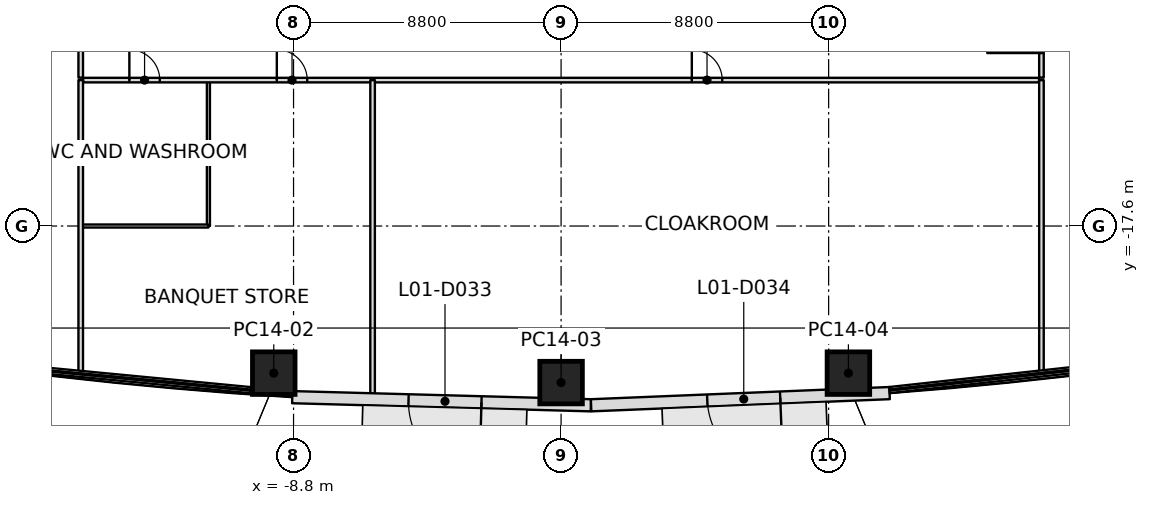
"""IFC4 building model, lengths in metres.
Left out: names, types, materials, properties, quantities, classifications, styles, units other than length and angle.
Written with IfcOpenShell. Run it as: python <this file> out.ifc"""

import sys

from ifc_helpers import new_model, si_unit, direction, frame, frame_2d, origin, origin_2d, place, context, subcontext, project, spatial, rectangle, extrude, element, fill, save


model = new_model("IFC4")
c1 = context("Model", 3, precision=1e-05, world=origin(), true_north=direction((0.0, 1.0)))
c2 = subcontext(c1, "Body", "Model", "MODEL_VIEW")
j1 = project(units=[si_unit("LENGTHUNIT", "METRE"), si_unit("PLANEANGLEUNIT", "RADIAN")], contexts=[c1])
p1 = place(None, origin())
s1 = spatial("IfcSite", under=j1, at=p1, CompositionType="ELEMENT")
p2 = place(p1, origin())
s2 = spatial("IfcBuilding", under=s1, at=p2, CompositionType="ELEMENT")
p3 = place(p2, frame((0.0, 0.0, 9.0)))
s3 = spatial("IfcBuildingStorey", under=s2, at=p3, CompositionType="ELEMENT", Elevation=9.0)
for number, where, z_axis, x_axis in (
    (1, (-9.45, -22.439, 0.0), (0.0, 0.0, 1.0), (-0.998, 0.066, 0.0)),
    (2, (0.0, -22.75, 0.0), (0.0, 0.0, 1.0), (1.0, 0.0, 0.0)),
    (3, (9.45, -22.439, 0.0), (0.0, 0.0, 1.0), (0.998, 0.066, 0.0)),
):
    element("IfcColumn", number, at=place(p3, frame(where, z_axis=z_axis, x_axis=x_axis)), inside=s3, PredefinedType="COLUMN", context=c2, shape_type="SweptSolid", body=[
        extrude(rectangle(XDim=1.4, YDim=1.4, at=origin_2d()), origin(), (0.0, 0.0, 1.0), 7.8),
    ])
p4 = place(p3, frame((0.98, -23.497, 0.0), z_axis=(0.0, 0.0, 1.0), x_axis=(-0.999629782494, 0.027208416899, 0.0)))
e4 = element("IfcWall", 4, at=p4, inside=s3, PredefinedType="STANDARD", context=c2, shape_type="SweptSolid", body=[
    extrude(rectangle(XDim=9.825, YDim=0.4, at=frame_2d((4.913, 0.0))), origin(), (0.0, 0.0, 1.0), 6.9),
])
p5 = place(p4, frame((3.6, 0.0, 0.0)))
e5 = element("IfcOpeningElement", 5, at=p5, cuts=e4, PredefinedType="OPENING", context=c2, shape_type="SweptSolid", body=[
    extrude(rectangle(XDim=2.4, YDim=3.0, at=frame_2d((1.2, 1.5))), frame((0.0, 0.2, 0.0), z_axis=(0.0, -1.0, 0.0), x_axis=(1.0, 0.0, 0.0)), (0.0, 0.0, 1.0), 0.4),
])
p6 = place(p3, frame((10.804, -23.096, 0.0), z_axis=(0.0, 0.0, 1.0), x_axis=(-0.999167350404, -0.04079958195, 0.0)))
e6 = element("IfcWall", 6, at=p6, inside=s3, PredefinedType="STANDARD", context=c2, shape_type="SweptSolid", body=[
    extrude(rectangle(XDim=9.826, YDim=0.4, at=frame_2d((4.913, 0.0))), origin(), (0.0, 0.0, 1.0), 6.9),
])
p7 = place(p6, frame((3.6, 0.0, 0.0)))
e7 = element("IfcOpeningElement", 7, at=p7, cuts=e6, PredefinedType="OPENING", context=c2, shape_type="SweptSolid", body=[
    extrude(rectangle(XDim=2.4, YDim=3.0, at=frame_2d((1.2, 1.5))), frame((0.0, 0.2, 0.0), z_axis=(0.0, -1.0, 0.0), x_axis=(1.0, 0.0, 0.0)), (0.0, 0.0, 1.0), 0.4),
])
p8 = place(p3, frame((-15.8, -12.8, 0.0), z_axis=(0.0, 0.0, 1.0), x_axis=(0.0, -1.0, 0.0)))
e8 = element("IfcWall", 8, at=p8, inside=s3, PredefinedType="PARTITIONING", context=c2, shape_type="SweptSolid", body=[
    extrude(rectangle(XDim=9.71, YDim=0.15, at=frame_2d((4.855, 0.0))), origin(), (0.0, 0.0, 1.0), 6.934),
])
p9 = place(p3, frame((-6.2, -12.8, 0.0), z_axis=(0.0, 0.0, 1.0), x_axis=(0.0, -1.0, 0.0)))
e9 = element("IfcWall", 9, at=p9, inside=s3, PredefinedType="PARTITIONING", context=c2, shape_type="SweptSolid", body=[
    extrude(rectangle(XDim=10.444, YDim=0.15, at=frame_2d((5.222, 0.0))), origin(), (0.0, 0.0, 1.0), 6.934),
])
p10 = place(p3, frame((15.8, -12.8, 0.0), z_axis=(0.0, 0.0, 1.0), x_axis=(0.0, -1.0, 0.0)))
e10 = element("IfcWall", 10, at=p10, inside=s3, PredefinedType="PARTITIONING", context=c2, shape_type="SweptSolid", body=[
    extrude(rectangle(XDim=9.71, YDim=0.15, at=frame_2d((4.855, 0.0))), origin(), (0.0, 0.0, 1.0), 6.934),
])
p11 = place(p3, frame((-15.8, 12.72, 0.0), z_axis=(0.0, 0.0, 1.0), x_axis=(0.0, -1.0, 0.0)))
e11 = element("IfcWall", 11, at=p11, inside=s3, PredefinedType="PARTITIONING", context=c2, shape_type="SweptSolid", body=[
    extrude(rectangle(XDim=25.44, YDim=0.15, at=frame_2d((12.72, 0.0))), origin(), (0.0, 0.0, 1.0), 6.647),
])
p12 = place(p11, frame((12.23, 0.0, 0.0)))
e12 = element("IfcOpeningElement", 12, at=p12, cuts=e11, PredefinedType="OPENING", context=c2, shape_type="SweptSolid", body=[
    extrude(rectangle(XDim=1.0, YDim=2.1, at=frame_2d((0.5, 1.05))), frame((0.0, 0.075, 0.0), z_axis=(0.0, -1.0, 0.0), x_axis=(1.0, 0.0, 0.0)), (0.0, 0.0, 1.0), 0.15),
])
p13 = place(p3, frame((-15.72, -12.8, 0.0), z_axis=(0.0, 0.0, 1.0), x_axis=(1.0, 0.0, 0.0)))
e13 = element("IfcWall", 13, at=p13, inside=s3, PredefinedType="PARTITIONING", context=c2, shape_type="SweptSolid", body=[
    extrude(rectangle(XDim=31.44, YDim=0.15, at=frame_2d((15.72, 0.0))), origin(), (0.0, 0.0, 1.0), 6.947),
])
p14 = place(p13, frame((1.52, 0.0, 0.0)))
e14 = element("IfcOpeningElement", 14, at=p14, cuts=e13, PredefinedType="OPENING", context=c2, shape_type="SweptSolid", body=[
    extrude(rectangle(XDim=1.0, YDim=2.1, at=frame_2d((0.5, 1.05))), frame((0.0, 0.075, 0.0), z_axis=(0.0, -1.0, 0.0), x_axis=(1.0, 0.0, 0.0)), (0.0, 0.0, 1.0), 0.15),
])
p15 = place(p13, frame((6.37, 0.0, 0.0)))
e15 = element("IfcOpeningElement", 15, at=p15, cuts=e13, PredefinedType="OPENING", context=c2, shape_type="SweptSolid", body=[
    extrude(rectangle(XDim=1.0, YDim=2.1, at=frame_2d((0.5, 1.05))), frame((0.0, 0.075, 0.0), z_axis=(0.0, -1.0, 0.0), x_axis=(1.0, 0.0, 0.0)), (0.0, 0.0, 1.0), 0.15),
])
p16 = place(p13, frame((20.02, 0.0, 0.0)))
e16 = element("IfcOpeningElement", 16, at=p16, cuts=e13, PredefinedType="OPENING", context=c2, shape_type="SweptSolid", body=[
    extrude(rectangle(XDim=1.0, YDim=2.1, at=frame_2d((0.5, 1.05))), frame((0.0, 0.075, 0.0), z_axis=(0.0, -1.0, 0.0), x_axis=(1.0, 0.0, 0.0)), (0.0, 0.0, 1.0), 0.15),
])
p17 = place(p3, frame((15.8, -12.72, 0.0), z_axis=(0.0, 0.0, 1.0), x_axis=(0.0, 1.0, 0.0)))
e17 = element("IfcWall", 17, at=p17, inside=s3, PredefinedType="PARTITIONING", context=c2, shape_type="SweptSolid", body=[
    extrude(rectangle(XDim=25.44, YDim=0.15, at=frame_2d((12.72, 0.0))), origin(), (0.0, 0.0, 1.0), 6.647),
])
p18 = place(p17, frame((0.81, 0.0, 0.0)))
e18 = element("IfcOpeningElement", 18, at=p18, cuts=e17, PredefinedType="OPENING", context=c2, shape_type="SweptSolid", body=[
    extrude(rectangle(XDim=1.8, YDim=2.1, at=frame_2d((0.9, 1.05))), frame((0.0, 0.075, 0.0), z_axis=(0.0, -1.0, 0.0), x_axis=(1.0, 0.0, 0.0)), (0.0, 0.0, 1.0), 0.15),
])
p19 = place(p17, frame((13.62, 0.0, 0.0)))
e19 = element("IfcOpeningElement", 19, at=p19, cuts=e17, PredefinedType="OPENING", context=c2, shape_type="SweptSolid", body=[
    extrude(rectangle(XDim=1.8, YDim=2.1, at=frame_2d((0.9, 1.05))), frame((0.0, 0.075, 0.0), z_axis=(0.0, -1.0, 0.0), x_axis=(1.0, 0.0, 0.0)), (0.0, 0.0, 1.0), 0.15),
])
p20 = place(p3, frame((-11.6, -12.83, 0.0), z_axis=(0.0, 0.0, 1.0), x_axis=(0.0, -1.0, 0.0)))
e20 = element("IfcWall", 20, at=p20, inside=s3, PredefinedType="PARTITIONING", context=c2, shape_type="SweptSolid", body=[
    extrude(rectangle(XDim=4.77, YDim=0.1, at=frame_2d((2.385, 0.0))), origin(), (0.0, 0.0, 1.0), 7.15),
])
p21 = place(p3, frame((-11.6, -17.6, 0.0), z_axis=(0.0, 0.0, 1.0), x_axis=(-1.0, 0.0, 0.0)))
e21 = element("IfcWall", 21, at=p21, inside=s3, PredefinedType="PARTITIONING", context=c2, shape_type="SweptSolid", body=[
    extrude(rectangle(XDim=4.17, YDim=0.1, at=frame_2d((2.085, 0.0))), origin(), (0.0, 0.0, 1.0), 7.017),
])
p22 = place(p5, origin())
e22 = element("IfcDoor", 22, at=p22, inside=s3, OperationType="DOUBLE_DOOR_SINGLE_SWING", PredefinedType="DOOR", context=c2, shape_type="SweptSolid", body=[
    extrude(rectangle(XDim=2.4, YDim=3.0, at=frame_2d((1.2, 1.5))), frame((0.0, 0.025, 0.0), z_axis=(0.0, -1.0, 0.0), x_axis=(1.0, 0.0, 0.0)), (0.0, 0.0, 1.0), 0.05),
])
fill(e5, e22)
p23 = place(p7, origin())
e23 = element("IfcDoor", 23, at=p23, inside=s3, OperationType="DOUBLE_DOOR_SINGLE_SWING", PredefinedType="DOOR", context=c2, shape_type="SweptSolid", body=[
    extrude(rectangle(XDim=2.4, YDim=3.0, at=frame_2d((1.2, 1.5))), frame((0.0, 0.025, 0.0), z_axis=(0.0, -1.0, 0.0), x_axis=(1.0, 0.0, 0.0)), (0.0, 0.0, 1.0), 0.05),
])
fill(e7, e23)
p24 = place(p14, origin())
e24 = element("IfcDoor", 24, at=p24, inside=s3, OperationType="SINGLE_SWING_RIGHT", PredefinedType="DOOR", context=c2, shape_type="SweptSolid", body=[
    extrude(rectangle(XDim=1.0, YDim=2.1, at=frame_2d((0.5, 1.05))), frame((0.0, 0.025, 0.0), z_axis=(0.0, -1.0, 0.0), x_axis=(1.0, 0.0, 0.0)), (0.0, 0.0, 1.0), 0.05),
])
fill(e14, e24)
p25 = place(p15, origin())
e25 = element("IfcDoor", 25, at=p25, inside=s3, OperationType="SINGLE_SWING_RIGHT", PredefinedType="DOOR", context=c2, shape_type="SweptSolid", body=[
    extrude(rectangle(XDim=1.0, YDim=2.1, at=frame_2d((0.5, 1.05))), frame((0.0, 0.025, 0.0), z_axis=(0.0, -1.0, 0.0), x_axis=(1.0, 0.0, 0.0)), (0.0, 0.0, 1.0), 0.05),
])
fill(e15, e25)
p26 = place(p16, origin())
e26 = element("IfcDoor", 26, at=p26, inside=s3, OperationType="SINGLE_SWING_RIGHT", PredefinedType="DOOR", context=c2, shape_type="SweptSolid", body=[
    extrude(rectangle(XDim=1.0, YDim=2.1, at=frame_2d((0.5, 1.05))), frame((0.0, 0.025, 0.0), z_axis=(0.0, -1.0, 0.0), x_axis=(1.0, 0.0, 0.0)), (0.0, 0.0, 1.0), 0.05),
])
fill(e16, e26)
p27 = place(p18, origin())
e27 = element("IfcDoor", 27, at=p27, inside=s3, OperationType="DOUBLE_DOOR_SINGLE_SWING", PredefinedType="DOOR", context=c2, shape_type="SweptSolid", body=[
    extrude(rectangle(XDim=1.8, YDim=2.1, at=frame_2d((0.9, 1.05))), frame((0.0, 0.025, 0.0), z_axis=(0.0, -1.0, 0.0), x_axis=(1.0, 0.0, 0.0)), (0.0, 0.0, 1.0), 0.05),
])
fill(e18, e27)
save(model, sys.argv[1])
